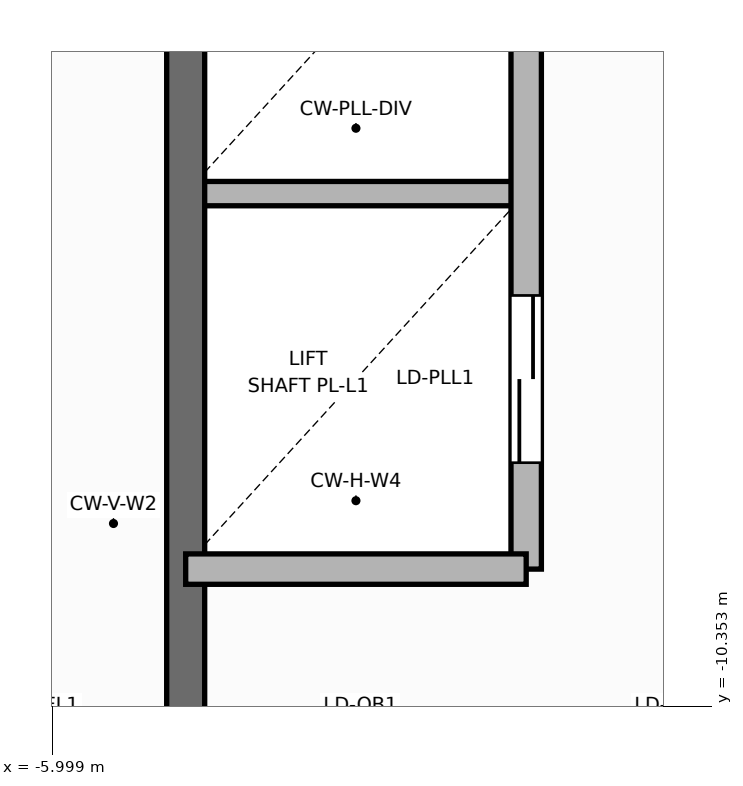
"""IFC4 building model, lengths in metres.
Left out: names, types, materials, properties, quantities, classifications, styles, units other than length and angle.
Written with IfcOpenShell. Run it as: python <this file> out.ifc"""

import sys

from ifc_helpers import new_model, si_unit, direction, frame, frame_2d, origin, place, context, subcontext, project, spatial, rectangle, extrude, element, fill, save


model = new_model("IFC4")
c1 = context("Model", 3, precision=1e-05, world=origin(), true_north=direction((0.0, 1.0)))
c2 = subcontext(c1, "Body", "Model", "MODEL_VIEW")
j1 = project(units=[si_unit("LENGTHUNIT", "METRE"), si_unit("PLANEANGLEUNIT", "RADIAN")], contexts=[c1])
p1 = place(None, origin())
s1 = spatial("IfcSite", under=j1, at=p1, CompositionType="ELEMENT")
p2 = place(p1, origin())
s2 = spatial("IfcBuilding", under=s1, at=p2, CompositionType="ELEMENT")
p3 = place(p2, frame((0.0, 0.0, 18.9)))
s3 = spatial("IfcBuildingStorey", under=s2, at=p3, CompositionType="ELEMENT", Elevation=18.9)
p4 = place(p3, frame((-5.12, -6.98, 0.0), z_axis=(0.0, 0.0, 1.0), x_axis=(1.0, 0.0, 0.0)))
e1 = element("IfcWall", 1, at=p4, inside=s3, PredefinedType="PARTITIONING", context=c2, shape_type="SweptSolid", body=[
    extrude(rectangle(XDim=2.24, YDim=0.16, at=frame_2d((1.12, 0.0))), origin(), (0.0, 0.0, 1.0), 5.15),
])
p5 = place(p3, frame((-5.12, -13.85, 0.0), z_axis=(0.0, 0.0, 1.0), x_axis=(0.0, 1.0, 0.0)))
e2 = element("IfcWall", 2, at=p5, inside=s3, PredefinedType="SHEAR", context=c2, shape_type="SweptSolid", body=[
    extrude(rectangle(XDim=9.4, YDim=0.25, at=frame_2d((4.7, 0.0))), origin(), (0.0, 0.0, 1.0), 5.4),
])
p6 = place(p3, frame((-2.88, -9.45, 0.0), z_axis=(0.0, 0.0, 1.0), x_axis=(0.0, 1.0, 0.0)))
e3 = element("IfcWall", 3, at=p6, inside=s3, PredefinedType="SOLIDWALL", context=c2, shape_type="SweptSolid", body=[
    extrude(rectangle(XDim=5.0, YDim=0.2, at=frame_2d((2.5, 0.0))), origin(), (0.0, 0.0, 1.0), 5.15),
])
p7 = place(p6, frame((0.7, 0.0, 0.0)))
e4 = element("IfcOpeningElement", 4, at=p7, cuts=e3, PredefinedType="OPENING", context=c2, shape_type="SweptSolid", body=[
    extrude(rectangle(XDim=1.106, YDim=2.104, at=frame_2d((0.55, 1.052))), frame((0.0, 0.11, 0.0), z_axis=(0.0, -1.0, 0.0), x_axis=(1.0, 0.0, 0.0)), (0.0, 0.0, 1.0), 0.22),
])
p8 = place(p3, frame((-5.12, -9.45, 0.0), z_axis=(0.0, 0.0, 1.0), x_axis=(1.0, 0.0, 0.0)))
e5 = element("IfcWall", 5, at=p8, inside=s3, PredefinedType="SOLIDWALL", context=c2, shape_type="SweptSolid", body=[
    extrude(rectangle(XDim=2.24, YDim=0.2, at=frame_2d((1.12, 0.0))), origin(), (0.0, 0.0, 1.0), 5.15),
])
p9 = place(p7, origin())
e6 = element("IfcDoor", 6, at=p9, inside=s3, OperationType="DOUBLE_DOOR_SLIDING", PredefinedType="DOOR", context=c2, shape_type="SweptSolid", body=[
    extrude(rectangle(XDim=1.1, YDim=2.1, at=frame_2d((0.55, 1.05))), frame((0.0, 0.025, 0.0), z_axis=(0.0, -1.0, 0.0), x_axis=(1.0, 0.0, 0.0)), (0.0, 0.0, 1.0), 0.05),
])
fill(e4, e6)
save(model, sys.argv[1])
